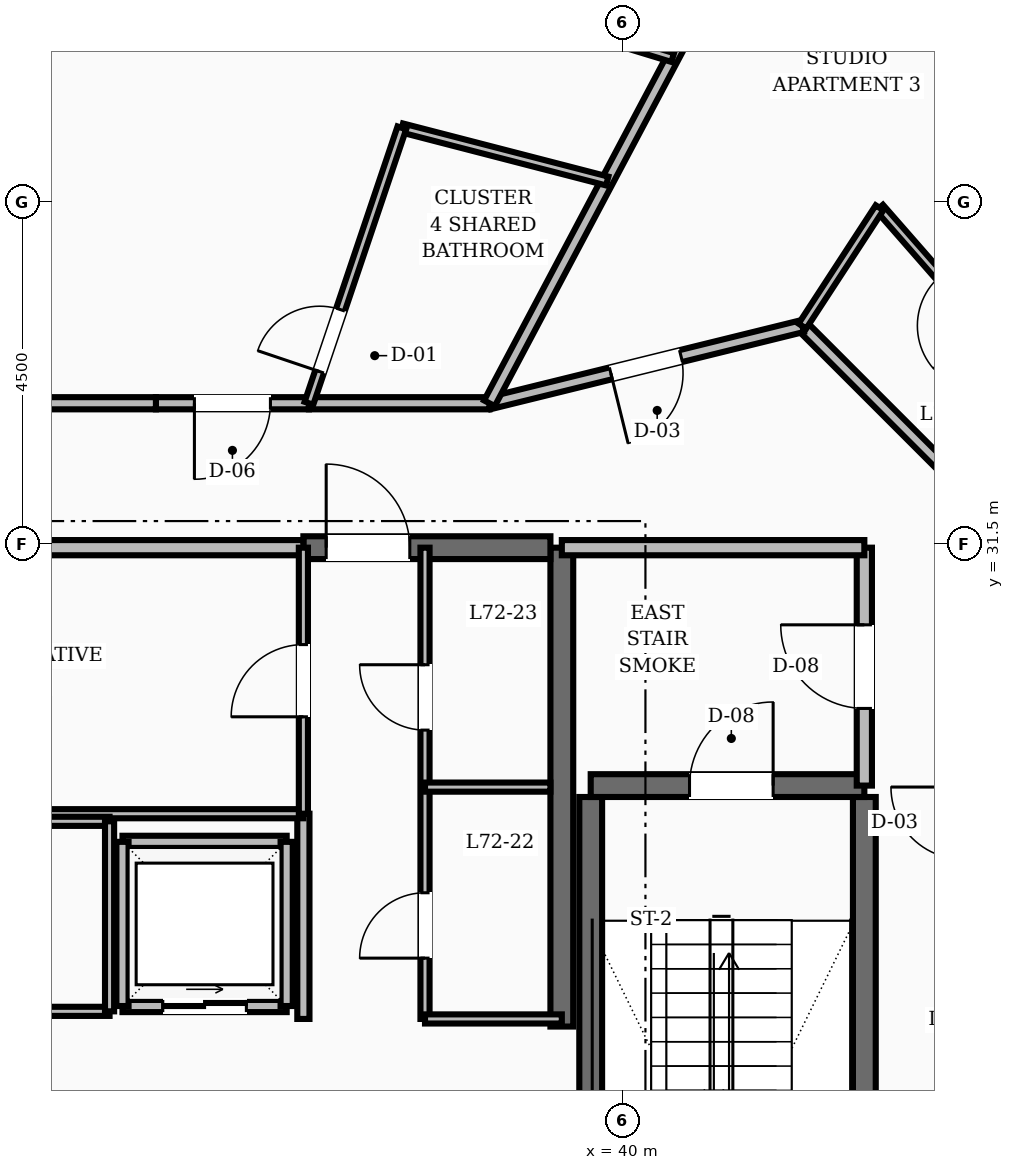
"""IFC4 building model, lengths in metres.
Left out: names, types, materials, properties, quantities, classifications, styles, units other than length and angle.
Written with IfcOpenShell. Run it as: python <this file> out.ifc"""

import sys

from ifc_helpers import new_model, si_unit, direction, frame, frame_2d, origin, place, context, subcontext, project, spatial, rectangle, extrude, element, fill, save


model = new_model("IFC4")
c1 = context("Model", 3, precision=1e-05, world=origin(), true_north=direction((0.0, 1.0)))
c2 = subcontext(c1, "Body", "Model", "MODEL_VIEW")
j1 = project(units=[si_unit("LENGTHUNIT", "METRE"), si_unit("PLANEANGLEUNIT", "RADIAN")], contexts=[c1])
p1 = place(None, origin())
s1 = spatial("IfcSite", under=j1, at=p1, CompositionType="ELEMENT")
p2 = place(p1, origin())
s2 = spatial("IfcBuilding", under=s1, at=p2, CompositionType="ELEMENT")
p3 = place(p2, frame((0.0, 0.0, 276.0)))
s3 = spatial("IfcBuildingStorey", under=s2, at=p3, CompositionType="ELEMENT", Elevation=276.0)
p4 = place(p3, frame((39.2, 25.15, 0.0), z_axis=(0.0, 0.0, 1.0), x_axis=(0.0, 1.0, 0.0)))
e1 = element("IfcWall", 1, at=p4, inside=s3, PredefinedType="SHEAR", context=c2, shape_type="SweptSolid", body=[
    extrude(rectangle(XDim=6.3, YDim=0.3, at=frame_2d((3.15, 0.0))), origin(), (0.0, 0.0, 1.0), 3.6),
])
p5 = place(p3, frame((35.8, 31.45, 0.0), z_axis=(0.0, 0.0, 1.0), x_axis=(1.0, 0.0, 0.0)))
e2 = element("IfcWall", 2, at=p5, inside=s3, PredefinedType="SHEAR", context=c2, shape_type="SweptSolid", body=[
    extrude(rectangle(XDim=3.25, YDim=0.3, at=frame_2d((1.625, 0.0))), origin(), (0.0, 0.0, 1.0), 3.6),
])
p6 = place(p5, frame((0.3, 0.0, 0.0)))
e3 = element("IfcOpeningElement", 3, at=p6, cuts=e2, PredefinedType="OPENING", context=c2, shape_type="SweptSolid", body=[
    extrude(rectangle(XDim=1.1, YDim=2.1, at=frame_2d((0.55, 1.05))), frame((0.0, 0.16, 0.0), z_axis=(0.0, -1.0, 0.0), x_axis=(1.0, 0.0, 0.0)), (0.0, 0.0, 1.0), 0.32),
])
for number, where, z_axis, x_axis in (
    (4, (43.18, 19.43, 0.0), (0.0, 0.0, 1.0), (0.0, 1.0, 0.0)),
    (5, (39.58, 19.43, 0.0), (0.0, 0.0, 1.0), (0.0, 1.0, 0.0)),
):
    element("IfcWall", number, at=place(p3, frame(where, z_axis=z_axis, x_axis=x_axis)), inside=s3, PredefinedType="SHEAR", context=c2, shape_type="SweptSolid", body=[
        extrude(rectangle(XDim=8.74, YDim=0.3, at=frame_2d((4.37, 0.0))), origin(), (0.0, 0.0, 1.0), 3.6),
    ])
p7 = place(p3, frame((39.58, 28.32, 0.0), z_axis=(0.0, 0.0, 1.0), x_axis=(1.0, 0.0, 0.0)))
e6 = element("IfcWall", 6, at=p7, inside=s3, PredefinedType="SHEAR", context=c2, shape_type="SweptSolid", body=[
    extrude(rectangle(XDim=3.6, YDim=0.3, at=frame_2d((1.8, 0.0))), origin(), (0.0, 0.0, 1.0), 3.6),
])
p8 = place(p7, frame((1.3, 0.0, 0.0)))
e7 = element("IfcOpeningElement", 7, at=p8, cuts=e6, PredefinedType="OPENING", context=c2, shape_type="SweptSolid", body=[
    extrude(rectangle(XDim=1.1, YDim=2.1, at=frame_2d((0.55, 1.05))), frame((0.0, 0.16, 0.0), z_axis=(0.0, -1.0, 0.0), x_axis=(1.0, 0.0, 0.0)), (0.0, 0.0, 1.0), 0.32),
])
p9 = place(p3, frame((43.18, 28.32, 0.0), z_axis=(0.0, 0.0, 1.0), x_axis=(0.0, 1.0, 0.0)))
e8 = element("IfcWall", 8, at=p9, inside=s3, PredefinedType="SOLIDWALL", context=c2, shape_type="SweptSolid", body=[
    extrude(rectangle(XDim=3.13, YDim=0.2, at=frame_2d((1.565, 0.0))), origin(), (0.0, 0.0, 1.0), 2.87),
])
p10 = place(p9, frame((1.015, 0.0, 0.0)))
e9 = element("IfcOpeningElement", 9, at=p10, cuts=e8, PredefinedType="OPENING", context=c2, shape_type="SweptSolid", body=[
    extrude(rectangle(XDim=1.1, YDim=2.1, at=frame_2d((0.55, 1.05))), frame((0.0, 0.11, 0.0), z_axis=(0.0, -1.0, 0.0), x_axis=(1.0, 0.0, 0.0)), (0.0, 0.0, 1.0), 0.22),
])
p11 = place(p3, frame((39.2, 31.45, 0.0), z_axis=(0.0, 0.0, 1.0), x_axis=(1.0, 0.0, 0.0)))
e10 = element("IfcWall", 10, at=p11, inside=s3, PredefinedType="SOLIDWALL", context=c2, shape_type="SweptSolid", body=[
    extrude(rectangle(XDim=3.98, YDim=0.2, at=frame_2d((1.99, 0.0))), origin(), (0.0, 0.0, 1.0), 2.87),
])
p12 = place(p3, frame((35.8, 25.25, 0.0), z_axis=(0.0, 0.0, 1.0), x_axis=(0.0, 1.0, 0.0)))
e11 = element("IfcWall", 11, at=p12, inside=s3, PredefinedType="SOLIDWALL", context=c2, shape_type="SweptSolid", body=[
    extrude(rectangle(XDim=2.7, YDim=0.16, at=frame_2d((1.35, 0.0))), origin(), (0.0, 0.0, 1.0), 2.87),
])
p13 = place(p3, frame((33.42, 25.42, 0.0), z_axis=(0.0, 0.0, 1.0), x_axis=(1.0, 0.0, 0.0)))
e12 = element("IfcWall", 12, at=p13, inside=s3, PredefinedType="SOLIDWALL", context=c2, shape_type="SweptSolid", body=[
    extrude(rectangle(XDim=2.16, YDim=0.16, at=frame_2d((1.08, 0.0))), origin(), (0.0, 0.0, 1.0), 2.87),
])
p14 = place(p13, frame((0.53, 0.0, 0.0)))
e13 = element("IfcOpeningElement", 13, at=p14, cuts=e12, PredefinedType="OPENING", context=c2, shape_type="SweptSolid", body=[
    extrude(rectangle(XDim=1.1, YDim=2.15, at=frame_2d((0.55, 1.075))), frame((0.0, 0.09, 0.0), z_axis=(0.0, -1.0, 0.0), x_axis=(1.0, 0.0, 0.0)), (0.0, 0.0, 1.0), 0.18),
])
for number, where, z_axis, x_axis in (
    (14, (33.42, 27.58, 0.0), (0.0, 0.0, 1.0), (1.0, 0.0, 0.0)),
    (15, (33.42, 25.42, 0.0), (0.0, 0.0, 1.0), (0.0, 1.0, 0.0)),
    (16, (35.58, 25.42, 0.0), (0.0, 0.0, 1.0), (0.0, 1.0, 0.0)),
):
    element("IfcWall", number, at=place(p3, frame(where, z_axis=z_axis, x_axis=x_axis)), inside=s3, PredefinedType="SOLIDWALL", context=c2, shape_type="SweptSolid", body=[
        extrude(rectangle(XDim=2.16, YDim=0.16, at=frame_2d((1.08, 0.0))), origin(), (0.0, 0.0, 1.0), 2.87),
    ])
p15 = place(p3, frame((28.2, 31.45, 0.0), z_axis=(0.0, 0.0, 1.0), x_axis=(1.0, 0.0, 0.0)))
e17 = element("IfcWall", 17, at=p15, inside=s3, PredefinedType="SOLIDWALL", context=c2, shape_type="SweptSolid", body=[
    extrude(rectangle(XDim=7.6, YDim=0.2, at=frame_2d((3.8, 0.0))), origin(), (0.0, 0.0, 1.0), 2.87),
])
p16 = place(p3, frame((28.2, 27.95, 0.0), z_axis=(0.0, 0.0, 1.0), x_axis=(1.0, 0.0, 0.0)))
e18 = element("IfcWall", 18, at=p16, inside=s3, PredefinedType="PARTITIONING", context=c2, shape_type="SweptSolid", body=[
    extrude(rectangle(XDim=7.6, YDim=0.12, at=frame_2d((3.8, 0.0))), origin(), (0.0, 0.0, 1.0), 2.87),
])
p17 = place(p3, frame((35.8, 27.95, 0.0), z_axis=(0.0, 0.0, 1.0), x_axis=(0.0, 1.0, 0.0)))
e19 = element("IfcWall", 19, at=p17, inside=s3, PredefinedType="PARTITIONING", context=c2, shape_type="SweptSolid", body=[
    extrude(rectangle(XDim=3.5, YDim=0.12, at=frame_2d((1.75, 0.0))), origin(), (0.0, 0.0, 1.0), 2.87),
])
p18 = place(p17, frame((1.275, 0.0, 0.0)))
e20 = element("IfcOpeningElement", 20, at=p18, cuts=e19, PredefinedType="OPENING", context=c2, shape_type="SweptSolid", body=[
    extrude(rectangle(XDim=0.95, YDim=2.1, at=frame_2d((0.475, 1.05))), frame((0.0, 0.07, 0.0), z_axis=(0.0, -1.0, 0.0), x_axis=(1.0, 0.0, 0.0)), (0.0, 0.0, 1.0), 0.14),
])
p19 = place(p3, frame((28.3, 25.35, 0.0), z_axis=(0.0, 0.0, 1.0), x_axis=(1.0, 0.0, 0.0)))
e21 = element("IfcWall", 21, at=p19, inside=s3, PredefinedType="PARTITIONING", context=c2, shape_type="SweptSolid", body=[
    extrude(rectangle(XDim=4.95, YDim=0.12, at=frame_2d((2.475, 0.0))), origin(), (0.0, 0.0, 1.0), 2.87),
])
p20 = place(p19, frame((2.0, 0.0, 0.0)))
e22 = element("IfcOpeningElement", 22, at=p20, cuts=e21, PredefinedType="OPENING", context=c2, shape_type="SweptSolid", body=[
    extrude(rectangle(XDim=0.95, YDim=2.1, at=frame_2d((0.475, 1.05))), frame((0.0, 0.07, 0.0), z_axis=(0.0, -1.0, 0.0), x_axis=(1.0, 0.0, 0.0)), (0.0, 0.0, 1.0), 0.14),
])
p21 = place(p3, frame((28.3, 27.85, 0.0), z_axis=(0.0, 0.0, 1.0), x_axis=(1.0, 0.0, 0.0)))
e23 = element("IfcWall", 23, at=p21, inside=s3, PredefinedType="PARTITIONING", context=c2, shape_type="SweptSolid", body=[
    extrude(rectangle(XDim=4.95, YDim=0.12, at=frame_2d((2.475, 0.0))), origin(), (0.0, 0.0, 1.0), 2.87),
])
p22 = place(p3, frame((33.25, 25.35, 0.0), z_axis=(0.0, 0.0, 1.0), x_axis=(0.0, 1.0, 0.0)))
e24 = element("IfcWall", 24, at=p22, inside=s3, PredefinedType="PARTITIONING", context=c2, shape_type="SweptSolid", body=[
    extrude(rectangle(XDim=2.5, YDim=0.12, at=frame_2d((1.25, 0.0))), origin(), (0.0, 0.0, 1.0), 2.87),
])
p23 = place(p3, frame((37.4, 25.25, 0.0), z_axis=(0.0, 0.0, 1.0), x_axis=(0.0, 1.0, 0.0)))
e25 = element("IfcWall", 25, at=p23, inside=s3, PredefinedType="PARTITIONING", context=c2, shape_type="SweptSolid", body=[
    extrude(rectangle(XDim=6.2, YDim=0.12, at=frame_2d((3.1, 0.0))), origin(), (0.0, 0.0, 1.0), 2.87),
])
p24 = place(p23, frame((0.8, 0.0, 0.0)))
e26 = element("IfcOpeningElement", 26, at=p24, cuts=e25, PredefinedType="OPENING", context=c2, shape_type="SweptSolid", body=[
    extrude(rectangle(XDim=0.86, YDim=2.1, at=frame_2d((0.43, 1.05))), frame((0.0, 0.07, 0.0), z_axis=(0.0, -1.0, 0.0), x_axis=(1.0, 0.0, 0.0)), (0.0, 0.0, 1.0), 0.14),
])
p25 = place(p23, frame((3.8, 0.0, 0.0)))
e27 = element("IfcOpeningElement", 27, at=p25, cuts=e25, PredefinedType="OPENING", context=c2, shape_type="SweptSolid", body=[
    extrude(rectangle(XDim=0.86, YDim=2.1, at=frame_2d((0.43, 1.05))), frame((0.0, 0.07, 0.0), z_axis=(0.0, -1.0, 0.0), x_axis=(1.0, 0.0, 0.0)), (0.0, 0.0, 1.0), 0.14),
])
p26 = place(p3, frame((37.4, 25.25, 0.0), z_axis=(0.0, 0.0, 1.0), x_axis=(1.0, 0.0, 0.0)))
e28 = element("IfcWall", 28, at=p26, inside=s3, PredefinedType="PARTITIONING", context=c2, shape_type="SweptSolid", body=[
    extrude(rectangle(XDim=1.8, YDim=0.12, at=frame_2d((0.9, 0.0))), origin(), (0.0, 0.0, 1.0), 2.87),
])
p27 = place(p3, frame((37.4, 28.3, 0.0), z_axis=(0.0, 0.0, 1.0), x_axis=(1.0, 0.0, 0.0)))
e29 = element("IfcWall", 29, at=p27, inside=s3, PredefinedType="PARTITIONING", context=c2, shape_type="SweptSolid", body=[
    extrude(rectangle(XDim=1.65, YDim=0.12, at=frame_2d((0.825, 0.0))), origin(), (0.0, 0.0, 1.0), 2.87),
])
p28 = place(p3, frame((44.427, 32.303, 0.0), z_axis=(0.0, 0.0, 1.0), x_axis=(-0.707106781187, 0.707106781187, 0.0)))
e30 = element("IfcWall", 30, at=p28, inside=s3, PredefinedType="SOLIDWALL", context=c2, shape_type="SweptSolid", body=[
    extrude(rectangle(XDim=2.916, YDim=0.16, at=frame_2d((1.458, 0.0))), origin(), (0.0, 0.0, 1.0), 2.87),
])
p29 = place(p3, frame((42.365, 34.365, 0.0), z_axis=(0.0, 0.0, 1.0), x_axis=(-0.970939799552, -0.239323850978, 0.0)))
e31 = element("IfcWall", 31, at=p29, inside=s3, PredefinedType="SOLIDWALL", context=c2, shape_type="SweptSolid", body=[
    extrude(rectangle(XDim=4.241, YDim=0.16, at=frame_2d((2.12, 0.0))), origin(), (0.0, 0.0, 1.0), 2.87),
])
p30 = place(p29, frame((1.646, 0.0, 0.0)))
e32 = element("IfcOpeningElement", 32, at=p30, cuts=e31, PredefinedType="OPENING", context=c2, shape_type="SweptSolid", body=[
    extrude(rectangle(XDim=0.95, YDim=2.1, at=frame_2d((0.475, 1.05))), frame((0.0, 0.09, 0.0), z_axis=(0.0, -1.0, 0.0), x_axis=(1.0, 0.0, 0.0)), (0.0, 0.0, 1.0), 0.18),
])
p31 = place(p3, frame((38.248, 33.35, 0.0), z_axis=(0.0, 0.0, 1.0), x_axis=(-1.0, 0.0, 0.0)))
e33 = element("IfcWall", 33, at=p31, inside=s3, PredefinedType="SOLIDWALL", context=c2, shape_type="SweptSolid", body=[
    extrude(rectangle(XDim=2.375, YDim=0.16, at=frame_2d((1.188, 0.0))), origin(), (0.0, 0.0, 1.0), 2.87),
])
p32 = place(p3, frame((35.873, 33.35, 0.0), z_axis=(0.0, 0.0, 1.0), x_axis=(-1.0, 0.0, 0.0)))
e34 = element("IfcWall", 34, at=p32, inside=s3, PredefinedType="SOLIDWALL", context=c2, shape_type="SweptSolid", body=[
    extrude(rectangle(XDim=2.013, YDim=0.16, at=frame_2d((1.006, 0.0))), origin(), (0.0, 0.0, 1.0), 2.87),
])
p33 = place(p32, frame((0.507, 0.0, 0.0)))
e35 = element("IfcOpeningElement", 35, at=p33, cuts=e34, PredefinedType="OPENING", context=c2, shape_type="SweptSolid", body=[
    extrude(rectangle(XDim=1.0, YDim=2.1, at=frame_2d((0.5, 1.05))), frame((0.0, 0.09, 0.0), z_axis=(0.0, -1.0, 0.0), x_axis=(1.0, 0.0, 0.0)), (0.0, 0.0, 1.0), 0.18),
])
p34 = place(p3, frame((33.86, 33.35, 0.0), z_axis=(0.0, 0.0, 1.0), x_axis=(-1.0, 0.0, 0.0)))
e36 = element("IfcWall", 36, at=p34, inside=s3, PredefinedType="SOLIDWALL", context=c2, shape_type="SweptSolid", body=[
    extrude(rectangle(XDim=1.86, YDim=0.16, at=frame_2d((0.93, 0.0))), origin(), (0.0, 0.0, 1.0), 2.87),
])
p35 = place(p3, frame((45.529, 33.466, 0.0), z_axis=(0.0, 0.0, 1.0), x_axis=(-0.658568155217, 0.752521086039, 0.0)))
e37 = element("IfcWall", 37, at=p35, inside=s3, PredefinedType="PARTITIONING", context=c2, shape_type="SweptSolid", body=[
    extrude(rectangle(XDim=3.264, YDim=0.12, at=frame_2d((1.632, 0.0))), origin(), (0.0, 0.0, 1.0), 2.87),
])
p36 = place(p35, frame((1.202, 0.0, 0.0)))
e38 = element("IfcOpeningElement", 38, at=p36, cuts=e37, PredefinedType="OPENING", context=c2, shape_type="SweptSolid", body=[
    extrude(rectangle(XDim=0.86, YDim=2.1, at=frame_2d((0.43, 1.05))), frame((0.0, 0.07, 0.0), z_axis=(0.0, -1.0, 0.0), x_axis=(1.0, 0.0, 0.0)), (0.0, 0.0, 1.0), 0.14),
])
p37 = place(p3, frame((42.365, 34.365, 0.0), z_axis=(0.0, 0.0, 1.0), x_axis=(0.546091451309, 0.837725567717, 0.0)))
e39 = element("IfcWall", 39, at=p37, inside=s3, PredefinedType="PARTITIONING", context=c2, shape_type="SweptSolid", body=[
    extrude(rectangle(XDim=1.858, YDim=0.12, at=frame_2d((0.929, 0.0))), origin(), (0.0, 0.0, 1.0), 2.87),
])
p38 = place(p3, frame((38.248, 33.35, 0.0), z_axis=(0.0, 0.0, 1.0), x_axis=(0.468387037798, 0.883523391214, 0.0)))
e40 = element("IfcWall", 40, at=p38, inside=s3, PredefinedType="SOLIDWALL", context=c2, shape_type="SweptSolid", body=[
    extrude(rectangle(XDim=9.142, YDim=0.16, at=frame_2d((4.571, 0.0))), origin(), (0.0, 0.0, 1.0), 2.87),
])
p39 = place(p3, frame((39.798, 36.274, 0.0), z_axis=(0.0, 0.0, 1.0), x_axis=(-0.968113270106, 0.250512866424, 0.0)))
e41 = element("IfcWall", 41, at=p39, inside=s3, PredefinedType="PARTITIONING", context=c2, shape_type="SweptSolid", body=[
    extrude(rectangle(XDim=2.791, YDim=0.12, at=frame_2d((1.396, 0.0))), origin(), (0.0, 0.0, 1.0), 2.87),
])
p40 = place(p3, frame((35.873, 33.35, 0.0), z_axis=(0.0, 0.0, 1.0), x_axis=(0.319769329264, 0.947495422713, 0.0)))
e42 = element("IfcWall", 42, at=p40, inside=s3, PredefinedType="PARTITIONING", context=c2, shape_type="SweptSolid", body=[
    extrude(rectangle(XDim=3.823, YDim=0.12, at=frame_2d((1.912, 0.0))), origin(), (0.0, 0.0, 1.0), 2.87),
])
p41 = place(p40, frame((0.44, 0.0, 0.0)))
e43 = element("IfcOpeningElement", 43, at=p41, cuts=e42, PredefinedType="OPENING", context=c2, shape_type="SweptSolid", body=[
    extrude(rectangle(XDim=0.86, YDim=2.1, at=frame_2d((0.43, 1.05))), frame((0.0, 0.07, 0.0), z_axis=(0.0, -1.0, 0.0), x_axis=(1.0, 0.0, 0.0)), (0.0, 0.0, 1.0), 0.14),
])
p42 = place(p3, frame((40.659, 37.898, 0.0), z_axis=(0.0, 0.0, 1.0), x_axis=(-0.956559500831, 0.291537169792, 0.0)))
e44 = element("IfcWall", 44, at=p42, inside=s3, PredefinedType="PARTITIONING", context=c2, shape_type="SweptSolid", body=[
    extrude(rectangle(XDim=6.027, YDim=0.12, at=frame_2d((3.013, 0.0))), origin(), (0.0, 0.0, 1.0), 2.87),
])
p43 = place(p42, frame((3.462, 0.0, 0.0)))
e45 = element("IfcOpeningElement", 45, at=p43, cuts=e44, PredefinedType="OPENING", context=c2, shape_type="SweptSolid", body=[
    extrude(rectangle(XDim=0.95, YDim=2.1, at=frame_2d((0.475, 1.05))), frame((0.0, 0.07, 0.0), z_axis=(0.0, -1.0, 0.0), x_axis=(1.0, 0.0, 0.0)), (0.0, 0.0, 1.0), 0.14),
])
p44 = place(p8, origin())
e46 = element("IfcDoor", 46, at=p44, inside=s3, OperationType="SINGLE_SWING_RIGHT", PredefinedType="DOOR", context=c2, shape_type="SweptSolid", body=[
    extrude(rectangle(XDim=1.1, YDim=2.1, at=frame_2d((0.55, 1.05))), frame((0.0, 0.025, 0.0), z_axis=(0.0, -1.0, 0.0), x_axis=(1.0, 0.0, 0.0)), (0.0, 0.0, 1.0), 0.05),
])
fill(e7, e46)
p45 = place(p10, origin())
e47 = element("IfcDoor", 47, at=p45, inside=s3, OperationType="SINGLE_SWING_RIGHT", PredefinedType="DOOR", context=c2, shape_type="SweptSolid", body=[
    extrude(rectangle(XDim=1.1, YDim=2.1, at=frame_2d((0.55, 1.05))), frame((0.0, 0.025, 0.0), z_axis=(0.0, -1.0, 0.0), x_axis=(1.0, 0.0, 0.0)), (0.0, 0.0, 1.0), 0.05),
])
fill(e9, e47)
p46 = place(p6, origin())
e48 = element("IfcDoor", 48, at=p46, inside=s3, OperationType="SINGLE_SWING_LEFT", PredefinedType="DOOR", context=c2, shape_type="SweptSolid", body=[
    extrude(rectangle(XDim=1.1, YDim=2.1, at=frame_2d((0.55, 1.05))), frame((0.0, 0.025, 0.0), z_axis=(0.0, -1.0, 0.0), x_axis=(1.0, 0.0, 0.0)), (0.0, 0.0, 1.0), 0.05),
])
fill(e3, e48)
p47 = place(p14, origin())
e49 = element("IfcDoor", 49, at=p47, inside=s3, OperationType="SLIDING_TO_RIGHT", PredefinedType="DOOR", context=c2, shape_type="SweptSolid", body=[
    extrude(rectangle(XDim=1.1, YDim=2.15, at=frame_2d((0.55, 1.075))), frame((0.0, 0.025, 0.0), z_axis=(0.0, -1.0, 0.0), x_axis=(1.0, 0.0, 0.0)), (0.0, 0.0, 1.0), 0.05),
])
fill(e13, e49)
p48 = place(p18, origin())
e50 = element("IfcDoor", 50, at=p48, inside=s3, OperationType="SINGLE_SWING_LEFT", PredefinedType="DOOR", context=c2, shape_type="SweptSolid", body=[
    extrude(rectangle(XDim=0.95, YDim=2.1, at=frame_2d((0.475, 1.05))), frame((0.0, 0.025, 0.0), z_axis=(0.0, -1.0, 0.0), x_axis=(1.0, 0.0, 0.0)), (0.0, 0.0, 1.0), 0.05),
])
fill(e20, e50)
p49 = place(p24, origin())
e51 = element("IfcDoor", 51, at=p49, inside=s3, OperationType="SINGLE_SWING_LEFT", PredefinedType="DOOR", context=c2, shape_type="SweptSolid", body=[
    extrude(rectangle(XDim=0.86, YDim=2.1, at=frame_2d((0.43, 1.05))), frame((0.0, 0.025, 0.0), z_axis=(0.0, -1.0, 0.0), x_axis=(1.0, 0.0, 0.0)), (0.0, 0.0, 1.0), 0.05),
])
fill(e26, e51)
p50 = place(p25, origin())
e52 = element("IfcDoor", 52, at=p50, inside=s3, OperationType="SINGLE_SWING_RIGHT", PredefinedType="DOOR", context=c2, shape_type="SweptSolid", body=[
    extrude(rectangle(XDim=0.86, YDim=2.1, at=frame_2d((0.43, 1.05))), frame((0.0, 0.025, 0.0), z_axis=(0.0, -1.0, 0.0), x_axis=(1.0, 0.0, 0.0)), (0.0, 0.0, 1.0), 0.05),
])
fill(e27, e52)
p51 = place(p30, origin())
e53 = element("IfcDoor", 53, at=p51, inside=s3, OperationType="SINGLE_SWING_RIGHT", PredefinedType="DOOR", context=c2, shape_type="SweptSolid", body=[
    extrude(rectangle(XDim=0.95, YDim=2.1, at=frame_2d((0.475, 1.05))), frame((0.0, 0.025, 0.0), z_axis=(0.0, -1.0, 0.0), x_axis=(1.0, 0.0, 0.0)), (0.0, 0.0, 1.0), 0.05),
])
fill(e32, e53)
p52 = place(p41, origin())
e54 = element("IfcDoor", 54, at=p52, inside=s3, OperationType="SINGLE_SWING_LEFT", PredefinedType="DOOR", context=c2, shape_type="SweptSolid", body=[
    extrude(rectangle(XDim=0.86, YDim=2.1, at=frame_2d((0.43, 1.05))), frame((0.0, 0.025, 0.0), z_axis=(0.0, -1.0, 0.0), x_axis=(1.0, 0.0, 0.0)), (0.0, 0.0, 1.0), 0.05),
])
fill(e43, e54)
p53 = place(p33, origin())
e55 = element("IfcDoor", 55, at=p53, inside=s3, OperationType="SINGLE_SWING_RIGHT", PredefinedType="DOOR", context=c2, shape_type="SweptSolid", body=[
    extrude(rectangle(XDim=1.0, YDim=2.1, at=frame_2d((0.5, 1.05))), frame((0.0, 0.025, 0.0), z_axis=(0.0, -1.0, 0.0), x_axis=(1.0, 0.0, 0.0)), (0.0, 0.0, 1.0), 0.05),
])
fill(e35, e55)
save(model, sys.argv[1])
